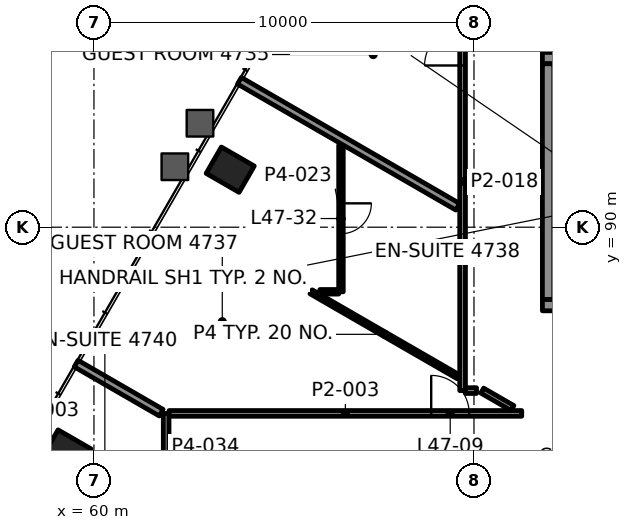
"""IFC4 building model, lengths in metres.
Left out: names, types, materials, properties, quantities, classifications, styles, units other than length and angle.
Written with IfcOpenShell. Run it as: python <this file> out.ifc"""

import sys

from ifc_helpers import new_model, si_unit, direction, frame, frame_2d, origin, origin_2d, place, context, subcontext, project, spatial, rectangle, hollow_rectangle, extrude, element, fill, save


model = new_model("IFC4")
c1 = context("Model", 3, precision=1e-05, world=origin(), true_north=direction((0.0, 1.0)))
c2 = subcontext(c1, "Body", "Model", "MODEL_VIEW")
j1 = project(units=[si_unit("LENGTHUNIT", "METRE"), si_unit("PLANEANGLEUNIT", "RADIAN")], contexts=[c1])
p1 = place(None, origin())
s1 = spatial("IfcSite", under=j1, at=p1, CompositionType="ELEMENT")
p2 = place(p1, origin())
s2 = spatial("IfcBuilding", under=s1, at=p2, CompositionType="ELEMENT")
p3 = place(p2, frame((0.0, 0.0, 202.6)))
s3 = spatial("IfcBuildingStorey", under=s2, at=p3, CompositionType="ELEMENT", Elevation=202.6)
for number, where, z_axis, x_axis in (
    (1, (63.586, 91.513, -0.0), (0.0, 0.0, 1.0), (-0.5, -0.866, 0.0)),
    (2, (59.289, 84.071, -0.0), (0.0, 0.0, 1.0), (-0.5, -0.866, 0.0)),
):
    element("IfcColumn", number, at=place(p3, frame(where, z_axis=z_axis, x_axis=x_axis)), inside=s3, PredefinedType="COLUMN", context=c2, shape_type="SweptSolid", body=[
        extrude(hollow_rectangle(XDim=0.8, YDim=1.0, WallThickness=0.05, at=origin_2d()), origin(), (0.0, 0.0, 1.0), 3.9),
    ])
p4 = place(p3, frame((71.8, 87.95, 0.0), z_axis=(0.0, 0.0, 1.0), x_axis=(1.0, 0.0, 0.0)))
e3 = element("IfcWall", 3, at=p4, inside=s3, PredefinedType="SHEAR", context=c2, shape_type="SweptSolid", body=[
    extrude(rectangle(XDim=6.4, YDim=0.3, at=frame_2d((3.2, 0.0))), origin(), (0.0, 0.0, 1.0), 3.7),
])
p5 = place(p4, frame((1.325, 0.0, 0.0)))
e4 = element("IfcOpeningElement", 4, at=p5, cuts=e3, PredefinedType="OPENING", context=c2, shape_type="SweptSolid", body=[
    extrude(rectangle(XDim=1.0, YDim=2.1, at=frame_2d((0.5, 1.05))), frame((0.0, 0.16, 0.0), z_axis=(0.0, -1.0, 0.0), x_axis=(1.0, 0.0, 0.0)), (0.0, 0.0, 1.0), 0.32),
])
p6 = place(p4, frame((4.125, 0.0, 0.0)))
e5 = element("IfcOpeningElement", 5, at=p6, cuts=e3, PredefinedType="OPENING", context=c2, shape_type="SweptSolid", body=[
    extrude(rectangle(XDim=1.2, YDim=2.1, at=frame_2d((0.6, 1.05))), frame((0.0, 0.16, 0.0), z_axis=(0.0, -1.0, 0.0), x_axis=(1.0, 0.0, 0.0)), (0.0, 0.0, 1.0), 0.32),
])
p7 = place(p3, frame((71.8, 94.45, 0.0), z_axis=(0.0, 0.0, 1.0), x_axis=(1.0, 0.0, 0.0)))
e6 = element("IfcWall", 6, at=p7, inside=s3, PredefinedType="SHEAR", context=c2, shape_type="SweptSolid", body=[
    extrude(rectangle(XDim=6.4, YDim=0.3, at=frame_2d((3.2, 0.0))), origin(), (0.0, 0.0, 1.0), 3.7),
])
p8 = place(p3, frame((71.95, 88.1, 0.0), z_axis=(0.0, 0.0, 1.0), x_axis=(0.0, 1.0, 0.0)))
e7 = element("IfcWall", 7, at=p8, inside=s3, PredefinedType="SHEAR", context=c2, shape_type="SweptSolid", body=[
    extrude(rectangle(XDim=6.2, YDim=0.3, at=frame_2d((3.1, 0.0))), origin(), (0.0, 0.0, 1.0), 3.7),
])
p9 = place(p3, frame((61.976, 85.1, 0.0), z_axis=(0.0, 0.0, 1.0), x_axis=(1.0, 0.0, 0.0)))
e8 = element("IfcWall", 8, at=p9, inside=s3, PredefinedType="PARTITIONING", context=c2, shape_type="SweptSolid", body=[
    extrude(rectangle(XDim=9.281, YDim=0.15, at=frame_2d((4.64, 0.0))), origin(), (0.0, 0.0, 1.0), 3.097),
])
p10 = place(p9, frame((6.899, 0.0, 0.0)))
e9 = element("IfcOpeningElement", 9, at=p10, cuts=e8, PredefinedType="OPENING", context=c2, shape_type="SweptSolid", body=[
    extrude(rectangle(XDim=1.0, YDim=2.1, at=frame_2d((0.5, 1.05))), frame((0.0, 0.085, 0.0), z_axis=(0.0, -1.0, 0.0), x_axis=(1.0, 0.0, 0.0)), (0.0, 0.0, 1.0), 0.17),
])
p11 = place(p3, frame((69.775, 85.7, 0.0), z_axis=(0.0, 0.0, 1.0), x_axis=(1.0, 0.0, 0.0)))
e10 = element("IfcWall", 10, at=p11, inside=s3, PredefinedType="PARTITIONING", context=c2, shape_type="SweptSolid", body=[
    extrude(rectangle(XDim=0.292, YDim=0.15, at=frame_2d((0.146, 0.0))), origin(), (0.0, 0.0, 1.0), 3.097),
])
p12 = place(p3, frame((65.944, 88.3, 0.0), z_axis=(0.0, 0.0, 1.0), x_axis=(1.0, 0.0, 0.0)))
e11 = element("IfcWall", 11, at=p12, inside=s3, PredefinedType="PARTITIONING", context=c2, shape_type="SweptSolid", body=[
    extrude(rectangle(XDim=0.496, YDim=0.12, at=frame_2d((0.248, 0.0))), origin(), (0.0, 0.0, 1.0), 3.097),
])
p13 = place(p3, frame((69.7, 85.7, 0.0), z_axis=(0.0, 0.0, 1.0), x_axis=(0.0, 1.0, 0.0)))
e12 = element("IfcWall", 12, at=p13, inside=s3, PredefinedType="PARTITIONING", context=c2, shape_type="SweptSolid", body=[
    extrude(rectangle(XDim=10.999, YDim=0.15, at=frame_2d((5.5, 0.0))), origin(), (0.0, 0.0, 1.0), 3.097),
])
p14 = place(p13, frame((8.555, 0.0, 0.0)))
e13 = element("IfcOpeningElement", 13, at=p14, cuts=e12, PredefinedType="OPENING", context=c2, shape_type="SweptSolid", body=[
    extrude(rectangle(XDim=1.0, YDim=2.1, at=frame_2d((0.5, 1.05))), frame((0.0, 0.085, 0.0), z_axis=(0.0, -1.0, 0.0), x_axis=(1.0, 0.0, 0.0)), (0.0, 0.0, 1.0), 0.17),
])
p15 = place(p3, frame((66.5, 92.156, 0.0), z_axis=(0.0, 0.0, 1.0), x_axis=(0.0, -1.0, 0.0)))
e14 = element("IfcWall", 14, at=p15, inside=s3, PredefinedType="PARTITIONING", context=c2, shape_type="SweptSolid", body=[
    extrude(rectangle(XDim=3.856, YDim=0.12, at=frame_2d((1.928, 0.0))), origin(), (0.0, 0.0, 1.0), 3.1),
])
p16 = place(p15, frame((1.528, 0.0, 0.0)))
e15 = element("IfcOpeningElement", 15, at=p16, cuts=e14, PredefinedType="OPENING", context=c2, shape_type="SweptSolid", body=[
    extrude(rectangle(XDim=0.8, YDim=2.1, at=frame_2d((0.4, 1.05))), frame((0.0, 0.07, 0.0), z_axis=(0.0, -1.0, 0.0), x_axis=(1.0, 0.0, 0.0)), (0.0, 0.0, 1.0), 0.14),
])
p17 = place(p3, frame((61.9, 68.476, 0.0), z_axis=(0.0, 0.0, 1.0), x_axis=(0.0, 1.0, 0.0)))
e16 = element("IfcWall", 16, at=p17, inside=s3, PredefinedType="PARTITIONING", context=c2, shape_type="SweptSolid", body=[
    extrude(rectangle(XDim=16.624, YDim=0.15, at=frame_2d((8.312, 0.0))), origin(), (0.0, 0.0, 1.0), 3.1),
])
p18 = place(p17, frame((1.984, 0.0, 0.0)))
e17 = element("IfcOpeningElement", 17, at=p18, cuts=e16, PredefinedType="OPENING", context=c2, shape_type="SweptSolid", body=[
    extrude(rectangle(XDim=1.0, YDim=2.1, at=frame_2d((0.5, 1.05))), frame((0.0, 0.085, 0.0), z_axis=(0.0, -1.0, 0.0), x_axis=(1.0, 0.0, 0.0)), (0.0, 0.0, 1.0), 0.17),
])
p19 = place(p17, frame((10.437, 0.0, 0.0)))
e18 = element("IfcOpeningElement", 18, at=p19, cuts=e16, PredefinedType="OPENING", context=c2, shape_type="SweptSolid", body=[
    extrude(rectangle(XDim=1.0, YDim=2.1, at=frame_2d((0.5, 1.05))), frame((0.0, 0.085, 0.0), z_axis=(0.0, -1.0, 0.0), x_axis=(1.0, 0.0, 0.0)), (0.0, 0.0, 1.0), 0.17),
])
p20 = place(p3, frame((69.573, 90.537, 0.0), z_axis=(0.0, 0.0, 1.0), x_axis=(-0.866026229868, 0.499998569178, 0.0)))
e19 = element("IfcWall", 19, at=p20, inside=s3, PredefinedType="PARTITIONING", context=c2, shape_type="SweptSolid", body=[
    extrude(rectangle(XDim=6.633, YDim=0.2, at=frame_2d((3.317, 0.0))), origin(), (0.0, 0.0, 1.0), 3.022),
])
p21 = place(p3, frame((71.014, 85.24, 0.0), z_axis=(0.0, 0.0, 1.0), x_axis=(-0.865964657013, 0.500105201737, 0.0)))
e20 = element("IfcWall", 20, at=p21, inside=s3, PredefinedType="PARTITIONING", context=c2, shape_type="SweptSolid", body=[
    extrude(rectangle(XDim=0.92, YDim=0.15, at=frame_2d((0.46, 0.0))), origin(), (0.0, 0.0, 1.0), 3.097),
])
p22 = place(p3, frame((69.59, 86.062, 0.0), z_axis=(0.0, 0.0, 1.0), x_axis=(-0.866029361473, 0.49999314502, 0.0)))
e21 = element("IfcWall", 21, at=p22, inside=s3, PredefinedType="PARTITIONING", context=c2, shape_type="SweptSolid", body=[
    extrude(rectangle(XDim=4.476, YDim=0.12, at=frame_2d((2.238, 0.0))), origin(), (0.0, 0.0, 1.0), 3.097),
])
p23 = place(p3, frame((61.77, 85.119, 0.0), z_axis=(0.0, 0.0, 1.0), x_axis=(-0.866055039205, 0.499948666432, 0.0)))
e22 = element("IfcWall", 22, at=p23, inside=s3, PredefinedType="PARTITIONING", context=c2, shape_type="SweptSolid", body=[
    extrude(rectangle(XDim=2.585, YDim=0.2, at=frame_2d((1.292, 0.0))), origin(), (0.0, 0.0, 1.0), 3.022),
])
p24 = place(p10, origin())
e23 = element("IfcDoor", 23, at=p24, inside=s3, OperationType="SINGLE_SWING_RIGHT", PredefinedType="DOOR", context=c2, shape_type="SweptSolid", body=[
    extrude(rectangle(XDim=1.0, YDim=2.1, at=frame_2d((0.5, 1.05))), frame((0.0, 0.025, 0.0), z_axis=(0.0, -1.0, 0.0), x_axis=(1.0, 0.0, 0.0)), (0.0, 0.0, 1.0), 0.05),
])
fill(e9, e23)
p25 = place(p14, origin())
e24 = element("IfcDoor", 24, at=p25, inside=s3, OperationType="SINGLE_SWING_RIGHT", PredefinedType="DOOR", context=c2, shape_type="SweptSolid", body=[
    extrude(rectangle(XDim=1.0, YDim=2.1, at=frame_2d((0.5, 1.05))), frame((0.0, 0.025, 0.0), z_axis=(0.0, -1.0, 0.0), x_axis=(1.0, 0.0, 0.0)), (0.0, 0.0, 1.0), 0.05),
])
fill(e13, e24)
p26 = place(p16, origin())
e25 = element("IfcDoor", 25, at=p26, inside=s3, OperationType="SINGLE_SWING_RIGHT", PredefinedType="DOOR", context=c2, shape_type="SweptSolid", body=[
    extrude(rectangle(XDim=0.8, YDim=2.1, at=frame_2d((0.4, 1.05))), frame((0.0, 0.025, 0.0), z_axis=(0.0, -1.0, 0.0), x_axis=(1.0, 0.0, 0.0)), (0.0, 0.0, 1.0), 0.05),
])
fill(e15, e25)
save(model, sys.argv[1])
